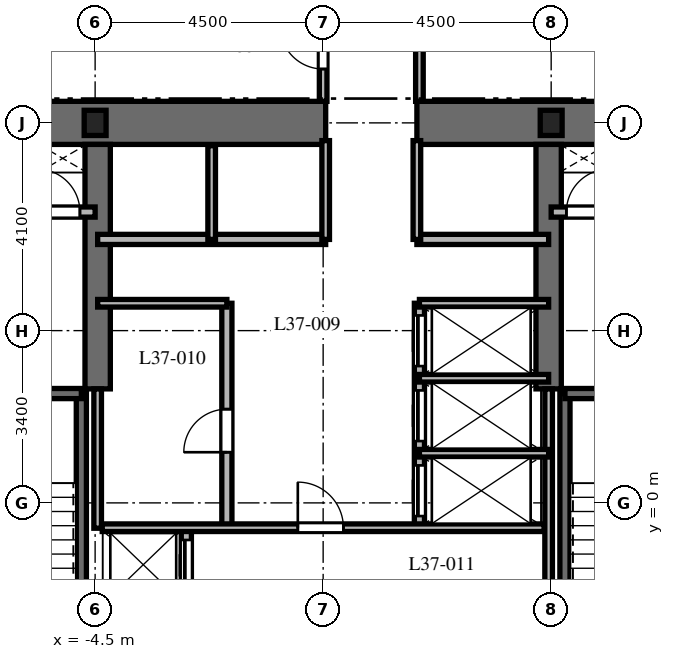
"""IFC4 building model, lengths in metres.
Left out: names, types, materials, properties, quantities, classifications, styles, units other than length and angle.
Written with IfcOpenShell. Run it as: python <this file> out.ifc"""

import sys

from ifc_helpers import new_model, si_unit, direction, frame, frame_2d, origin, origin_2d, place, context, subcontext, project, spatial, rectangle, i_section, extrude, element, fill, save


model = new_model("IFC4")
c1 = context("Model", 3, precision=1e-05, world=origin(), true_north=direction((0.0, 1.0)))
c2 = subcontext(c1, "Body", "Model", "MODEL_VIEW")
j1 = project(units=[si_unit("LENGTHUNIT", "METRE"), si_unit("PLANEANGLEUNIT", "RADIAN")], contexts=[c1])
p1 = place(None, origin())
s1 = spatial("IfcSite", under=j1, at=p1, CompositionType="ELEMENT")
p2 = place(p1, origin())
s2 = spatial("IfcBuilding", under=s1, at=p2, CompositionType="ELEMENT")
p3 = place(p2, frame((0.0, 0.0, 151.7)))
s3 = spatial("IfcBuildingStorey", under=s2, at=p3, CompositionType="ELEMENT", Elevation=151.7)
p4 = place(p3, frame((-9.425, 7.5, 0.0), z_axis=(0.0, 0.0, 1.0), x_axis=(1.0, 0.0, 0.0)))
e1 = element("IfcWall", 1, at=p4, inside=s3, PredefinedType="SHEAR", context=c2, shape_type="SweptSolid", body=[
    extrude(rectangle(XDim=9.475, YDim=0.85, at=frame_2d((4.738, 0.0))), origin(), (0.0, 0.0, 1.0), 3.7),
])
p5 = place(p3, frame((1.85, 7.5, 0.0), z_axis=(0.0, 0.0, 1.0), x_axis=(1.0, 0.0, 0.0)))
e2 = element("IfcWall", 2, at=p5, inside=s3, PredefinedType="SHEAR", context=c2, shape_type="SweptSolid", body=[
    extrude(rectangle(XDim=7.575, YDim=0.85, at=frame_2d((3.788, 0.0))), origin(), (0.0, 0.0, 1.0), 3.7),
])
for number, where, z_axis, x_axis in (
    (3, (-4.45, 2.25, 0.0), (0.0, 0.0, 1.0), (0.0, 1.0, 0.0)),
    (4, (4.45, 2.25, 0.0), (0.0, 0.0, 1.0), (0.0, 1.0, 0.0)),
):
    element("IfcWall", number, at=place(p3, frame(where, z_axis=z_axis, x_axis=x_axis)), inside=s3, PredefinedType="SHEAR", context=c2, shape_type="SweptSolid", body=[
        extrude(rectangle(XDim=4.825, YDim=0.5, at=frame_2d((2.413, 0.0))), origin(), (0.0, 0.0, 1.0), 3.7),
    ])
p6 = place(p3, frame((-4.772, -6.985, 0.0), z_axis=(0.0, 0.0, 1.0), x_axis=(0.0, 1.0, 0.0)))
e5 = element("IfcWall", 5, at=p6, inside=s3, PredefinedType="SHEAR", context=c2, shape_type="SweptSolid", body=[
    extrude(rectangle(XDim=9.143, YDim=0.2, at=frame_2d((4.572, 0.0))), origin(), (0.0, 0.0, 1.0), 3.7),
])
p7 = place(p3, frame((-8.458, 2.158, 0.0), z_axis=(0.0, 0.0, 1.0), x_axis=(1.0, 0.0, 0.0)))
e6 = element("IfcWall", 6, at=p7, inside=s3, PredefinedType="SHEAR", context=c2, shape_type="SweptSolid", body=[
    extrude(rectangle(XDim=3.686, YDim=0.2, at=frame_2d((1.843, 0.0))), origin(), (0.0, 0.0, 1.0), 3.7),
])
p8 = place(p7, frame((1.3, 0.0, 0.0)))
e7 = element("IfcOpeningElement", 7, at=p8, cuts=e6, PredefinedType="OPENING", context=c2, shape_type="SweptSolid", body=[
    extrude(rectangle(XDim=1.0, YDim=2.15, at=frame_2d((0.5, 1.075))), frame((0.0, 0.11, 0.0), z_axis=(0.0, -1.0, 0.0), x_axis=(1.0, 0.0, 0.0)), (0.0, 0.0, 1.0), 0.22),
])
p9 = place(p3, frame((4.772, -6.985, 0.0), z_axis=(0.0, 0.0, 1.0), x_axis=(0.0, 1.0, 0.0)))
e8 = element("IfcWall", 8, at=p9, inside=s3, PredefinedType="SHEAR", context=c2, shape_type="SweptSolid", body=[
    extrude(rectangle(XDim=9.143, YDim=0.2, at=frame_2d((4.572, 0.0))), origin(), (0.0, 0.0, 1.0), 3.7),
])
p10 = place(p3, frame((4.772, 2.158, 0.0), z_axis=(0.0, 0.0, 1.0), x_axis=(1.0, 0.0, 0.0)))
e9 = element("IfcWall", 9, at=p10, inside=s3, PredefinedType="SHEAR", context=c2, shape_type="SweptSolid", body=[
    extrude(rectangle(XDim=3.686, YDim=0.2, at=frame_2d((1.843, 0.0))), origin(), (0.0, 0.0, 1.0), 3.7),
])
p11 = place(p10, frame((1.35, 0.0, 0.0)))
e10 = element("IfcOpeningElement", 10, at=p11, cuts=e9, PredefinedType="OPENING", context=c2, shape_type="SweptSolid", body=[
    extrude(rectangle(XDim=1.0, YDim=2.15, at=frame_2d((0.5, 1.075))), frame((0.0, 0.11, 0.0), z_axis=(0.0, -1.0, 0.0), x_axis=(1.0, 0.0, 0.0)), (0.0, 0.0, 1.0), 0.22),
])
for number, where, z_axis, x_axis in (
    (11, (4.5, 7.5, 0.0), (0.0, 0.0, 1.0), (1.0, 0.0, 0.0)),
    (12, (-4.5, 7.5, 0.0), (0.0, 0.0, 1.0), (1.0, 0.0, 0.0)),
):
    element("IfcColumn", number, at=place(p3, frame(where, z_axis=z_axis, x_axis=x_axis)), inside=s3, PredefinedType="COLUMN", context=c2, shape_type="SweptSolid", body=[
        extrude(i_section(OverallWidth=0.432, OverallDepth=0.498, WebThickness=0.056, FlangeThickness=0.089, at=origin_2d()), origin(), (0.0, 0.0, 1.0), 3.7),
    ])
p12 = place(p3, frame((-8.55, 5.74, 0.0), z_axis=(0.0, 0.0, 1.0), x_axis=(1.0, 0.0, 0.0)))
e13 = element("IfcWall", 13, at=p12, inside=s3, PredefinedType="PARTITIONING", context=c2, shape_type="SweptSolid", body=[
    extrude(rectangle(XDim=4.05, YDim=0.2, at=frame_2d((2.025, 0.0))), origin(), (0.0, 0.0, 1.0), 3.4),
])
p13 = place(p12, frame((0.75, 0.0, 0.0)))
e14 = element("IfcOpeningElement", 14, at=p13, cuts=e13, PredefinedType="OPENING", context=c2, shape_type="SweptSolid", body=[
    extrude(rectangle(XDim=1.1, YDim=2.2, at=frame_2d((0.55, 1.1))), frame((0.0, 0.11, 0.0), z_axis=(0.0, -1.0, 0.0), x_axis=(1.0, 0.0, 0.0)), (0.0, 0.0, 1.0), 0.22),
])
p14 = place(p12, frame((2.9, 0.0, 0.0)))
e15 = element("IfcOpeningElement", 15, at=p14, cuts=e13, PredefinedType="OPENING", context=c2, shape_type="SweptSolid", body=[
    extrude(rectangle(XDim=0.85, YDim=2.03, at=frame_2d((0.425, 1.015))), frame((0.0, 0.11, 0.0), z_axis=(0.0, -1.0, 0.0), x_axis=(1.0, 0.0, 0.0)), (0.0, 0.0, 1.0), 0.22),
])
p15 = place(p3, frame((4.5, 5.74, 0.0), z_axis=(0.0, 0.0, 1.0), x_axis=(1.0, 0.0, 0.0)))
e16 = element("IfcWall", 16, at=p15, inside=s3, PredefinedType="PARTITIONING", context=c2, shape_type="SweptSolid", body=[
    extrude(rectangle(XDim=4.05, YDim=0.2, at=frame_2d((2.025, 0.0))), origin(), (0.0, 0.0, 1.0), 3.4),
])
p16 = place(p15, frame((0.3, 0.0, 0.0)))
e17 = element("IfcOpeningElement", 17, at=p16, cuts=e16, PredefinedType="OPENING", context=c2, shape_type="SweptSolid", body=[
    extrude(rectangle(XDim=0.85, YDim=2.03, at=frame_2d((0.425, 1.015))), frame((0.0, 0.11, 0.0), z_axis=(0.0, -1.0, 0.0), x_axis=(1.0, 0.0, 0.0)), (0.0, 0.0, 1.0), 0.22),
])
p17 = place(p15, frame((2.15, 0.0, 0.0)))
e18 = element("IfcOpeningElement", 18, at=p17, cuts=e16, PredefinedType="OPENING", context=c2, shape_type="SweptSolid", body=[
    extrude(rectangle(XDim=1.1, YDim=2.2, at=frame_2d((0.55, 1.1))), frame((0.0, 0.11, 0.0), z_axis=(0.0, -1.0, 0.0), x_axis=(1.0, 0.0, 0.0)), (0.0, 0.0, 1.0), 0.22),
])
p18 = place(p3, frame((-2.7, -1.972, 0.0), z_axis=(0.0, 0.0, 1.0), x_axis=(0.0, 1.0, 0.0)))
e19 = element("IfcWall", 19, at=p18, inside=s3, PredefinedType="PARTITIONING", context=c2, shape_type="SweptSolid", body=[
    extrude(rectangle(XDim=1.472, YDim=0.2, at=frame_2d((0.736, 0.0))), origin(), (0.0, 0.0, 1.0), 3.4),
])
p19 = place(p18, frame((0.24, 0.0, 0.0)))
e20 = element("IfcOpeningElement", 20, at=p19, cuts=e19, PredefinedType="OPENING", context=c2, shape_type="SweptSolid", body=[
    extrude(rectangle(XDim=1.0, YDim=2.2, at=frame_2d((0.5, 1.1))), frame((0.0, 0.11, 0.0), z_axis=(0.0, -1.0, 0.0), x_axis=(1.0, 0.0, 0.0)), (0.0, 0.0, 1.0), 0.22),
])
p20 = place(p3, frame((-4.45, 5.2, 0.0), z_axis=(0.0, 0.0, 1.0), x_axis=(1.0, 0.0, 0.0)))
e21 = element("IfcWall", 21, at=p20, inside=s3, PredefinedType="PARTITIONING", context=c2, shape_type="SweptSolid", body=[
    extrude(rectangle(XDim=4.5, YDim=0.2, at=frame_2d((2.25, 0.0))), origin(), (0.0, 0.0, 1.0), 3.4),
])
p21 = place(p3, frame((1.85, 5.2, 0.0), z_axis=(0.0, 0.0, 1.0), x_axis=(1.0, 0.0, 0.0)))
e22 = element("IfcWall", 22, at=p21, inside=s3, PredefinedType="PARTITIONING", context=c2, shape_type="SweptSolid", body=[
    extrude(rectangle(XDim=2.6, YDim=0.2, at=frame_2d((1.3, 0.0))), origin(), (0.0, 0.0, 1.0), 3.4),
])
p22 = place(p3, frame((-2.2, 5.2, 0.0), z_axis=(0.0, 0.0, 1.0), x_axis=(0.0, 1.0, 0.0)))
e23 = element("IfcWall", 23, at=p22, inside=s3, PredefinedType="PARTITIONING", context=c2, shape_type="SweptSolid", body=[
    extrude(rectangle(XDim=1.85, YDim=0.15, at=frame_2d((0.925, 0.0))), origin(), (0.0, 0.0, 1.0), 3.4),
])
for number, where, z_axis, x_axis in (
    (24, (0.05, 5.2, 0.0), (0.0, 0.0, 1.0), (0.0, 1.0, 0.0)),
    (25, (1.85, 5.2, 0.0), (0.0, 0.0, 1.0), (0.0, 1.0, 0.0)),
):
    element("IfcWall", number, at=place(p3, frame(where, z_axis=z_axis, x_axis=x_axis)), inside=s3, PredefinedType="PARTITIONING", context=c2, shape_type="SweptSolid", body=[
        extrude(rectangle(XDim=1.95, YDim=0.15, at=frame_2d((0.975, 0.0))), origin(), (0.0, 0.0, 1.0), 3.4),
    ])
p23 = place(p3, frame((-4.45, -0.5, 0.0), z_axis=(0.0, 0.0, 1.0), x_axis=(0.0, 1.0, 0.0)))
e26 = element("IfcWall", 26, at=p23, inside=s3, PredefinedType="PARTITIONING", context=c2, shape_type="SweptSolid", body=[
    extrude(rectangle(XDim=2.75, YDim=0.15, at=frame_2d((1.375, 0.0))), origin(), (0.0, 0.0, 1.0), 3.4),
])
p24 = place(p3, frame((4.45, -1.972, 0.0), z_axis=(0.0, 0.0, 1.0), x_axis=(0.0, 1.0, 0.0)))
e27 = element("IfcWall", 27, at=p24, inside=s3, PredefinedType="PARTITIONING", context=c2, shape_type="SweptSolid", body=[
    extrude(rectangle(XDim=4.222, YDim=0.15, at=frame_2d((2.111, 0.0))), origin(), (0.0, 0.0, 1.0), 3.4),
])
p25 = place(p3, frame((-1.9, -0.5, 0.0), z_axis=(0.0, 0.0, 1.0), x_axis=(0.0, 1.0, 0.0)))
e28 = element("IfcWall", 28, at=p25, inside=s3, PredefinedType="PARTITIONING", context=c2, shape_type="SweptSolid", body=[
    extrude(rectangle(XDim=4.44, YDim=0.2, at=frame_2d((2.22, 0.0))), origin(), (0.0, 0.0, 1.0), 3.4),
])
p26 = place(p25, frame((1.5, 0.0, 0.0)))
e29 = element("IfcOpeningElement", 29, at=p26, cuts=e28, PredefinedType="OPENING", context=c2, shape_type="SweptSolid", body=[
    extrude(rectangle(XDim=0.85, YDim=2.03, at=frame_2d((0.425, 1.015))), frame((0.0, 0.11, 0.0), z_axis=(0.0, -1.0, 0.0), x_axis=(1.0, 0.0, 0.0)), (0.0, 0.0, 1.0), 0.22),
])
p27 = place(p3, frame((-4.45, 3.94, 0.0), z_axis=(0.0, 0.0, 1.0), x_axis=(1.0, 0.0, 0.0)))
e30 = element("IfcWall", 30, at=p27, inside=s3, PredefinedType="PARTITIONING", context=c2, shape_type="SweptSolid", body=[
    extrude(rectangle(XDim=2.55, YDim=0.15, at=frame_2d((1.275, 0.0))), origin(), (0.0, 0.0, 1.0), 3.4),
])
p28 = place(p3, frame((1.9, -0.5, 0.0), z_axis=(0.0, 0.0, 1.0), x_axis=(0.0, 1.0, 0.0)))
e31 = element("IfcWall", 31, at=p28, inside=s3, PredefinedType="PARTITIONING", context=c2, shape_type="SweptSolid", body=[
    extrude(rectangle(XDim=4.44, YDim=0.2, at=frame_2d((2.22, 0.0))), origin(), (0.0, 0.0, 1.0), 3.4),
])
p29 = place(p28, frame((0.24, 0.0, 0.0)))
e32 = element("IfcOpeningElement", 32, at=p29, cuts=e31, PredefinedType="OPENING", context=c2, shape_type="SweptSolid", body=[
    extrude(rectangle(XDim=1.0, YDim=2.2, at=frame_2d((0.5, 1.1))), frame((0.0, 0.11, 0.0), z_axis=(0.0, -1.0, 0.0), x_axis=(1.0, 0.0, 0.0)), (0.0, 0.0, 1.0), 0.22),
])
p30 = place(p28, frame((1.72, 0.0, 0.0)))
e33 = element("IfcOpeningElement", 33, at=p30, cuts=e31, PredefinedType="OPENING", context=c2, shape_type="SweptSolid", body=[
    extrude(rectangle(XDim=1.0, YDim=2.2, at=frame_2d((0.5, 1.1))), frame((0.0, 0.11, 0.0), z_axis=(0.0, -1.0, 0.0), x_axis=(1.0, 0.0, 0.0)), (0.0, 0.0, 1.0), 0.22),
])
p31 = place(p28, frame((3.2, 0.0, 0.0)))
e34 = element("IfcOpeningElement", 34, at=p31, cuts=e31, PredefinedType="OPENING", context=c2, shape_type="SweptSolid", body=[
    extrude(rectangle(XDim=1.0, YDim=2.2, at=frame_2d((0.5, 1.1))), frame((0.0, 0.11, 0.0), z_axis=(0.0, -1.0, 0.0), x_axis=(1.0, 0.0, 0.0)), (0.0, 0.0, 1.0), 0.22),
])
for number, where, z_axis, x_axis in (
    (35, (1.9, 3.94, 0.0), (0.0, 0.0, 1.0), (1.0, 0.0, 0.0)),
    (36, (1.9, 0.98, 0.0), (0.0, 0.0, 1.0), (1.0, 0.0, 0.0)),
    (37, (1.9, 2.46, 0.0), (0.0, 0.0, 1.0), (1.0, 0.0, 0.0)),
):
    element("IfcWall", number, at=place(p3, frame(where, z_axis=z_axis, x_axis=x_axis)), inside=s3, PredefinedType="PARTITIONING", context=c2, shape_type="SweptSolid", body=[
        extrude(rectangle(XDim=2.55, YDim=0.15, at=frame_2d((1.275, 0.0))), origin(), (0.0, 0.0, 1.0), 3.4),
    ])
p32 = place(p3, frame((-4.36, -0.49, 0.0), z_axis=(0.0, 0.0, 1.0), x_axis=(1.0, 0.0, 0.0)))
e38 = element("IfcWall", 38, at=p32, inside=s3, PredefinedType="PARTITIONING", context=c2, shape_type="SweptSolid", body=[
    extrude(rectangle(XDim=8.72, YDim=0.15, at=frame_2d((4.36, 0.0))), origin(), (0.0, 0.0, 1.0), 3.4),
])
p33 = place(p32, frame((3.86, 0.0, 0.0)))
e39 = element("IfcOpeningElement", 39, at=p33, cuts=e38, PredefinedType="OPENING", context=c2, shape_type="SweptSolid", body=[
    extrude(rectangle(XDim=0.9, YDim=2.03, at=frame_2d((0.45, 1.015))), frame((0.0, 0.085, 0.0), z_axis=(0.0, -1.0, 0.0), x_axis=(1.0, 0.0, 0.0)), (0.0, 0.0, 1.0), 0.17),
])
p34 = place(p3, frame((1.9, 10.05, 0.0), z_axis=(0.0, 0.0, 1.0), x_axis=(0.0, -1.0, 0.0)))
e40 = element("IfcWall", 40, at=p34, inside=s3, PredefinedType="PARTITIONING", context=c2, shape_type="SweptSolid", body=[
    extrude(rectangle(XDim=2.125, YDim=0.15, at=frame_2d((1.062, 0.0))), origin(), (0.0, 0.0, 1.0), 3.4),
])
p35 = place(p3, frame((0.0, 7.925, 0.0), z_axis=(0.0, 0.0, 1.0), x_axis=(0.0, 1.0, 0.0)))
e41 = element("IfcWall", 41, at=p35, inside=s3, PredefinedType="PARTITIONING", context=c2, shape_type="SweptSolid", body=[
    extrude(rectangle(XDim=2.125, YDim=0.15, at=frame_2d((1.062, 0.0))), origin(), (0.0, 0.0, 1.0), 3.4),
])
p36 = place(p35, frame((0.638, 0.0, 0.0)))
e42 = element("IfcOpeningElement", 42, at=p36, cuts=e41, PredefinedType="OPENING", context=c2, shape_type="SweptSolid", body=[
    extrude(rectangle(XDim=0.85, YDim=2.03, at=frame_2d((0.425, 1.015))), frame((0.0, 0.085, 0.0), z_axis=(0.0, -1.0, 0.0), x_axis=(1.0, 0.0, 0.0)), (0.0, 0.0, 1.0), 0.17),
])
p37 = place(p14, origin())
e43 = element("IfcDoor", 43, at=p37, inside=s3, OperationType="SINGLE_SWING_LEFT", PredefinedType="DOOR", context=c2, shape_type="SweptSolid", body=[
    extrude(rectangle(XDim=0.85, YDim=2.03, at=frame_2d((0.425, 1.015))), frame((0.0, 0.025, 0.0), z_axis=(0.0, -1.0, 0.0), x_axis=(1.0, 0.0, 0.0)), (0.0, 0.0, 1.0), 0.05),
])
fill(e15, e43)
p38 = place(p16, origin())
e44 = element("IfcDoor", 44, at=p38, inside=s3, OperationType="SINGLE_SWING_RIGHT", PredefinedType="DOOR", context=c2, shape_type="SweptSolid", body=[
    extrude(rectangle(XDim=0.85, YDim=2.03, at=frame_2d((0.425, 1.015))), frame((0.0, 0.025, 0.0), z_axis=(0.0, -1.0, 0.0), x_axis=(1.0, 0.0, 0.0)), (0.0, 0.0, 1.0), 0.05),
])
fill(e17, e44)
p39 = place(p19, origin())
e45 = element("IfcDoor", 45, at=p39, inside=s3, OperationType="SLIDING_TO_LEFT", PredefinedType="DOOR", context=c2, shape_type="SweptSolid", body=[
    extrude(rectangle(XDim=1.0, YDim=2.2, at=frame_2d((0.5, 1.1))), frame((0.0, 0.025, 0.0), z_axis=(0.0, -1.0, 0.0), x_axis=(1.0, 0.0, 0.0)), (0.0, 0.0, 1.0), 0.05),
])
fill(e20, e45)
p40 = place(p26, origin())
e46 = element("IfcDoor", 46, at=p40, inside=s3, OperationType="SINGLE_SWING_LEFT", PredefinedType="DOOR", context=c2, shape_type="SweptSolid", body=[
    extrude(rectangle(XDim=0.85, YDim=2.03, at=frame_2d((0.425, 1.015))), frame((0.0, 0.025, 0.0), z_axis=(0.0, -1.0, 0.0), x_axis=(1.0, 0.0, 0.0)), (0.0, 0.0, 1.0), 0.05),
])
fill(e29, e46)
p41 = place(p29, origin())
e47 = element("IfcDoor", 47, at=p41, inside=s3, OperationType="SLIDING_TO_RIGHT", PredefinedType="DOOR", context=c2, shape_type="SweptSolid", body=[
    extrude(rectangle(XDim=1.0, YDim=2.2, at=frame_2d((0.5, 1.1))), frame((0.0, 0.025, 0.0), z_axis=(0.0, -1.0, 0.0), x_axis=(1.0, 0.0, 0.0)), (0.0, 0.0, 1.0), 0.05),
])
fill(e32, e47)
p42 = place(p30, origin())
e48 = element("IfcDoor", 48, at=p42, inside=s3, OperationType="SLIDING_TO_RIGHT", PredefinedType="DOOR", context=c2, shape_type="SweptSolid", body=[
    extrude(rectangle(XDim=1.0, YDim=2.2, at=frame_2d((0.5, 1.1))), frame((0.0, 0.025, 0.0), z_axis=(0.0, -1.0, 0.0), x_axis=(1.0, 0.0, 0.0)), (0.0, 0.0, 1.0), 0.05),
])
fill(e33, e48)
p43 = place(p31, origin())
e49 = element("IfcDoor", 49, at=p43, inside=s3, OperationType="SLIDING_TO_RIGHT", PredefinedType="DOOR", context=c2, shape_type="SweptSolid", body=[
    extrude(rectangle(XDim=1.0, YDim=2.2, at=frame_2d((0.5, 1.1))), frame((0.0, 0.025, 0.0), z_axis=(0.0, -1.0, 0.0), x_axis=(1.0, 0.0, 0.0)), (0.0, 0.0, 1.0), 0.05),
])
fill(e34, e49)
p44 = place(p33, origin())
e50 = element("IfcDoor", 50, at=p44, inside=s3, OperationType="SINGLE_SWING_LEFT", PredefinedType="DOOR", context=c2, shape_type="SweptSolid", body=[
    extrude(rectangle(XDim=0.9, YDim=2.03, at=frame_2d((0.45, 1.015))), frame((0.0, 0.025, 0.0), z_axis=(0.0, -1.0, 0.0), x_axis=(1.0, 0.0, 0.0)), (0.0, 0.0, 1.0), 0.05),
])
fill(e39, e50)
p45 = place(p36, origin())
e51 = element("IfcDoor", 51, at=p45, inside=s3, OperationType="SINGLE_SWING_RIGHT", PredefinedType="DOOR", context=c2, shape_type="SweptSolid", body=[
    extrude(rectangle(XDim=0.85, YDim=2.03, at=frame_2d((0.425, 1.015))), frame((0.0, 0.025, 0.0), z_axis=(0.0, -1.0, 0.0), x_axis=(1.0, 0.0, 0.0)), (0.0, 0.0, 1.0), 0.05),
])
fill(e42, e51)
save(model, sys.argv[1])
